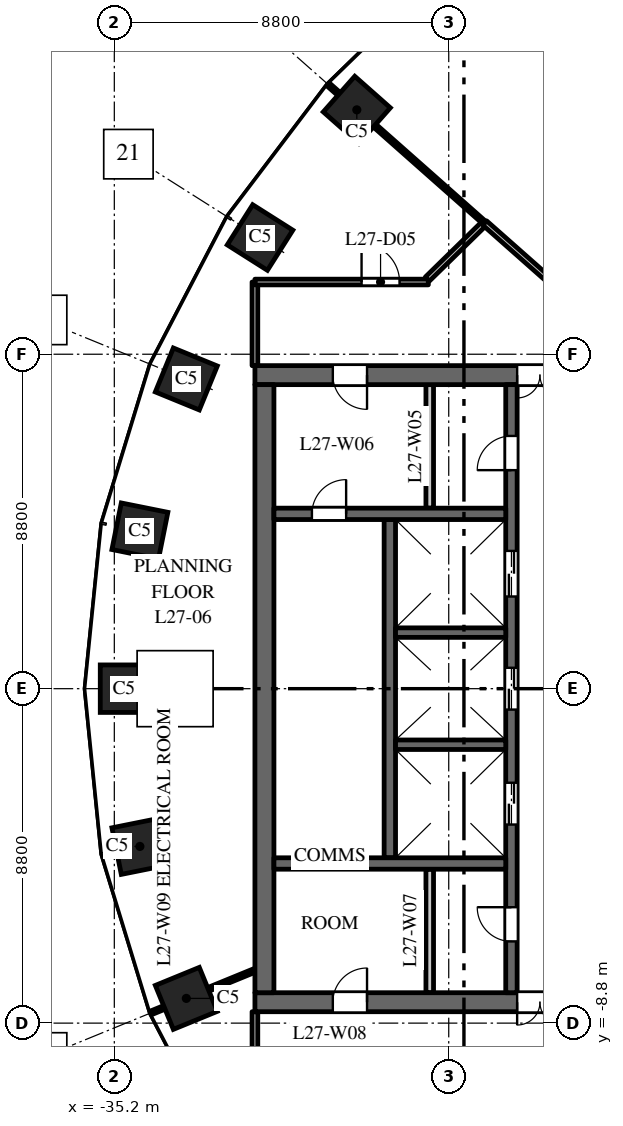
"""IFC4 building model, lengths in metres.
Left out: names, types, materials, properties, quantities, classifications, styles, units other than length and angle.
Written with IfcOpenShell. Run it as: python <this file> out.ifc"""

import sys

from ifc_helpers import new_model, si_unit, direction, frame, frame_2d, origin, origin_2d, place, context, subcontext, project, spatial, rectangle, extrude, element, fill, save


model = new_model("IFC4")
c1 = context("Model", 3, precision=1e-05, world=origin(), true_north=direction((0.0, 1.0)))
c2 = subcontext(c1, "Body", "Model", "MODEL_VIEW")
j1 = project(units=[si_unit("LENGTHUNIT", "METRE"), si_unit("PLANEANGLEUNIT", "RADIAN")], contexts=[c1])
p1 = place(None, origin())
s1 = spatial("IfcSite", under=j1, at=p1, CompositionType="ELEMENT")
p2 = place(p1, origin())
s2 = spatial("IfcBuilding", under=s1, at=p2, CompositionType="ELEMENT")
p3 = place(p2, frame((0.0, 0.0, 120.0)))
s3 = spatial("IfcBuildingStorey", under=s2, at=p3, CompositionType="ELEMENT", Elevation=120.0)
for number, where, z_axis, x_axis in (
    (1, (-28.819, 15.23, 0.0), (0.0, 0.0, 1.0), (-0.663, -0.749, 0.0)),
    (2, (-31.365, 11.871, 0.0), (0.0, 0.0, 1.0), (-0.535, -0.845, 0.0)),
    (3, (-33.305, 8.149, 0.0), (0.0, 0.0, 1.0), (-0.379, -0.925, 0.0)),
    (4, (-34.527, 4.151, 0.0), (0.0, 0.0, 1.0), (-0.197, -0.98, 0.0)),
    (5, (-34.945, 0.0, 0.0), (0.0, 0.0, 1.0), (0.0, -1.0, 0.0)),
    (6, (-34.527, -4.151, 0.0), (0.0, 0.0, 1.0), (0.197, -0.98, 0.0)),
    (7, (-33.305, -8.149, 0.0), (0.0, 0.0, 1.0), (0.379, -0.925, 0.0)),
):
    element("IfcColumn", number, at=place(p3, frame(where, z_axis=z_axis, x_axis=x_axis)), inside=s3, PredefinedType="COLUMN", context=c2, shape_type="SweptSolid", body=[
        extrude(rectangle(XDim=1.25, YDim=1.25, at=origin_2d()), origin(), (0.0, 0.0, 1.0), 4.0),
    ])
p4 = place(p3, frame((-16.5, 8.25, 0.0), z_axis=(0.0, 0.0, 1.0), x_axis=(-1.0, 0.0, 0.0)))
e8 = element("IfcWall", 8, at=p4, inside=s3, PredefinedType="SHEAR", context=c2, shape_type="SweptSolid", body=[
    extrude(rectangle(XDim=15.0, YDim=0.5, at=frame_2d((7.5, 0.0))), origin(), (0.0, 0.0, 1.0), 3.7),
])
p5 = place(p4, frame((6.9, 0.0, 0.0)))
e9 = element("IfcOpeningElement", 9, at=p5, cuts=e8, PredefinedType="OPENING", context=c2, shape_type="SweptSolid", body=[
    extrude(rectangle(XDim=1.2, YDim=2.1, at=frame_2d((0.6, 1.05))), frame((0.0, 0.26, 0.0), z_axis=(0.0, -1.0, 0.0), x_axis=(1.0, 0.0, 0.0)), (0.0, 0.0, 1.0), 0.52),
])
p6 = place(p4, frame((12.05, 0.0, 0.0)))
e10 = element("IfcOpeningElement", 10, at=p6, cuts=e8, PredefinedType="OPENING", context=c2, shape_type="SweptSolid", body=[
    extrude(rectangle(XDim=0.9, YDim=2.1, at=frame_2d((0.45, 1.05))), frame((0.0, 0.26, 0.0), z_axis=(0.0, -1.0, 0.0), x_axis=(1.0, 0.0, 0.0)), (0.0, 0.0, 1.0), 0.52),
])
p7 = place(p3, frame((-16.5, -8.25, 0.0), z_axis=(0.0, 0.0, 1.0), x_axis=(-1.0, 0.0, 0.0)))
e11 = element("IfcWall", 11, at=p7, inside=s3, PredefinedType="SHEAR", context=c2, shape_type="SweptSolid", body=[
    extrude(rectangle(XDim=15.0, YDim=0.5, at=frame_2d((7.5, 0.0))), origin(), (0.0, 0.0, 1.0), 3.7),
])
p8 = place(p7, frame((6.9, 0.0, 0.0)))
e12 = element("IfcOpeningElement", 12, at=p8, cuts=e11, PredefinedType="OPENING", context=c2, shape_type="SweptSolid", body=[
    extrude(rectangle(XDim=1.2, YDim=2.1, at=frame_2d((0.6, 1.05))), frame((0.0, 0.26, 0.0), z_axis=(0.0, -1.0, 0.0), x_axis=(1.0, 0.0, 0.0)), (0.0, 0.0, 1.0), 0.52),
])
p9 = place(p7, frame((12.05, 0.0, 0.0)))
e13 = element("IfcOpeningElement", 13, at=p9, cuts=e11, PredefinedType="OPENING", context=c2, shape_type="SweptSolid", body=[
    extrude(rectangle(XDim=0.9, YDim=2.1, at=frame_2d((0.45, 1.05))), frame((0.0, 0.26, 0.0), z_axis=(0.0, -1.0, 0.0), x_axis=(1.0, 0.0, 0.0)), (0.0, 0.0, 1.0), 0.52),
])
p10 = place(p3, frame((-27.95, -4.45, 0.0), z_axis=(0.0, 0.0, 1.0), x_axis=(0.0, 1.0, 0.0)))
e14 = element("IfcWall", 14, at=p10, inside=s3, PredefinedType="SHEAR", context=c2, shape_type="SweptSolid", body=[
    extrude(rectangle(XDim=8.9, YDim=0.3, at=frame_2d((4.45, 0.0))), origin(), (0.0, 0.0, 1.0), 3.7),
])
p11 = place(p3, frame((-24.75, -8.0, 0.0), z_axis=(0.0, 0.0, 1.0), x_axis=(0.0, 1.0, 0.0)))
e15 = element("IfcWall", 15, at=p11, inside=s3, PredefinedType="SHEAR", context=c2, shape_type="SweptSolid", body=[
    extrude(rectangle(XDim=16.0, YDim=0.3, at=frame_2d((8.0, 0.0))), origin(), (0.0, 0.0, 1.0), 3.7),
])
p12 = place(p11, frame((4.425, 0.0, 0.0)))
e16 = element("IfcOpeningElement", 16, at=p12, cuts=e15, PredefinedType="OPENING", context=c2, shape_type="SweptSolid", body=[
    extrude(rectangle(XDim=1.1, YDim=2.1, at=frame_2d((0.55, 1.05))), frame((0.0, 0.16, 0.0), z_axis=(0.0, -1.0, 0.0), x_axis=(1.0, 0.0, 0.0)), (0.0, 0.0, 1.0), 0.32),
])
p13 = place(p11, frame((7.45, 0.0, 0.0)))
e17 = element("IfcOpeningElement", 17, at=p13, cuts=e15, PredefinedType="OPENING", context=c2, shape_type="SweptSolid", body=[
    extrude(rectangle(XDim=1.1, YDim=2.1, at=frame_2d((0.55, 1.05))), frame((0.0, 0.16, 0.0), z_axis=(0.0, -1.0, 0.0), x_axis=(1.0, 0.0, 0.0)), (0.0, 0.0, 1.0), 0.32),
])
p14 = place(p11, frame((10.425, 0.0, 0.0)))
e18 = element("IfcOpeningElement", 18, at=p14, cuts=e15, PredefinedType="OPENING", context=c2, shape_type="SweptSolid", body=[
    extrude(rectangle(XDim=1.2, YDim=2.1, at=frame_2d((0.6, 1.05))), frame((0.0, 0.16, 0.0), z_axis=(0.0, -1.0, 0.0), x_axis=(1.0, 0.0, 0.0)), (0.0, 0.0, 1.0), 0.32),
])
p15 = place(p11, frame((13.75, 0.0, 0.0)))
e19 = element("IfcOpeningElement", 19, at=p15, cuts=e15, PredefinedType="OPENING", context=c2, shape_type="SweptSolid", body=[
    extrude(rectangle(XDim=0.9, YDim=2.1, at=frame_2d((0.45, 1.05))), frame((0.0, 0.16, 0.0), z_axis=(0.0, -1.0, 0.0), x_axis=(1.0, 0.0, 0.0)), (0.0, 0.0, 1.0), 0.32),
])
p16 = place(p11, frame((1.35, 0.0, 0.0)))
e20 = element("IfcOpeningElement", 20, at=p16, cuts=e15, PredefinedType="OPENING", context=c2, shape_type="SweptSolid", body=[
    extrude(rectangle(XDim=0.9, YDim=2.1, at=frame_2d((0.45, 1.05))), frame((0.0, 0.16, 0.0), z_axis=(0.0, -1.0, 0.0), x_axis=(1.0, 0.0, 0.0)), (0.0, 0.0, 1.0), 0.32),
])
p17 = place(p3, frame((-31.25, -8.0, 0.0), z_axis=(0.0, 0.0, 1.0), x_axis=(0.0, 1.0, 0.0)))
e21 = element("IfcWall", 21, at=p17, inside=s3, PredefinedType="SHEAR", context=c2, shape_type="SweptSolid", body=[
    extrude(rectangle(XDim=16.0, YDim=0.5, at=frame_2d((8.0, 0.0))), origin(), (0.0, 0.0, 1.0), 3.7),
])
p18 = place(p3, frame((-24.9, 4.6, 0.0), z_axis=(0.0, 0.0, 1.0), x_axis=(-1.0, 0.0, 0.0)))
e22 = element("IfcWall", 22, at=p18, inside=s3, PredefinedType="SHEAR", context=c2, shape_type="SweptSolid", body=[
    extrude(rectangle(XDim=6.1, YDim=0.3, at=frame_2d((3.05, 0.0))), origin(), (0.0, 0.0, 1.0), 3.7),
])
p19 = place(p18, frame((4.2, 0.0, 0.0)))
e23 = element("IfcOpeningElement", 23, at=p19, cuts=e22, PredefinedType="OPENING", context=c2, shape_type="SweptSolid", body=[
    extrude(rectangle(XDim=0.9, YDim=2.1, at=frame_2d((0.45, 1.05))), frame((0.0, 0.16, 0.0), z_axis=(0.0, -1.0, 0.0), x_axis=(1.0, 0.0, 0.0)), (0.0, 0.0, 1.0), 0.32),
])
for number, where, z_axis, x_axis in (
    (24, (-26.9, 4.75, 0.0), (0.0, 0.0, 1.0), (0.0, 1.0, 0.0)),
    (25, (-26.9, -8.0, 0.0), (0.0, 0.0, 1.0), (0.0, 1.0, 0.0)),
):
    element("IfcWall", number, at=place(p3, frame(where, z_axis=z_axis, x_axis=x_axis)), inside=s3, PredefinedType="PARTITIONING", context=c2, shape_type="SweptSolid", body=[
        extrude(rectangle(XDim=3.25, YDim=0.2, at=frame_2d((1.625, 0.0))), origin(), (0.0, 0.0, 1.0), 3.7),
    ])
p20 = place(p3, frame((-24.9, -4.6, 0.0), z_axis=(0.0, 0.0, 1.0), x_axis=(-1.0, 0.0, 0.0)))
e26 = element("IfcWall", 26, at=p20, inside=s3, PredefinedType="SHEAR", context=c2, shape_type="SweptSolid", body=[
    extrude(rectangle(XDim=6.1, YDim=0.3, at=frame_2d((3.05, 0.0))), origin(), (0.0, 0.0, 1.0), 3.7),
])
for number, where, z_axis, x_axis in (
    (27, (-24.9, -1.475, 0.0), (0.0, 0.0, 1.0), (-1.0, 0.0, 0.0)),
    (28, (-24.9, 1.475, 0.0), (0.0, 0.0, 1.0), (-1.0, 0.0, 0.0)),
):
    element("IfcWall", number, at=place(p3, frame(where, z_axis=z_axis, x_axis=x_axis)), inside=s3, PredefinedType="SHEAR", context=c2, shape_type="SweptSolid", body=[
        extrude(rectangle(XDim=2.9, YDim=0.25, at=frame_2d((1.45, 0.0))), origin(), (0.0, 0.0, 1.0), 3.7),
    ])
p21 = place(p3, frame((-34.234, -8.53, 0.0), z_axis=(0.0, 0.0, 1.0), x_axis=(0.925344112436, 0.379128307542, 0.0)))
e29 = element("IfcWall", 29, at=p21, inside=s3, PredefinedType="PARTITIONING", context=c2, shape_type="SweptSolid", body=[
    extrude(rectangle(XDim=2.954, YDim=0.1, at=frame_2d((1.477, 0.0))), origin(), (0.0, 0.0, 1.0), 2.9),
])
for number, where, z_axis, x_axis in (
    (30, (-31.5, -10.7, 0.0), (0.0, 0.0, 1.0), (0.0, 1.0, 0.0)),
    (31, (-31.5, 8.5, 0.0), (0.0, 0.0, 1.0), (0.0, 1.0, 0.0)),
):
    element("IfcWall", number, at=place(p3, frame(where, z_axis=z_axis, x_axis=x_axis)), inside=s3, PredefinedType="PARTITIONING", context=c2, shape_type="SweptSolid", body=[
        extrude(rectangle(XDim=2.2, YDim=0.15, at=frame_2d((1.1, 0.0))), origin(), (0.0, 0.0, 1.0), 3.7),
    ])
p22 = place(p3, frame((-31.5, 10.7, 0.0), z_axis=(0.0, 0.0, 1.0), x_axis=(1.0, 0.0, 0.0)))
e32 = element("IfcWall", 32, at=p22, inside=s3, PredefinedType="PARTITIONING", context=c2, shape_type="SweptSolid", body=[
    extrude(rectangle(XDim=4.563, YDim=0.15, at=frame_2d((2.281, 0.0))), origin(), (0.0, 0.0, 1.0), 3.1),
])
p23 = place(p22, frame((2.806, 0.0, 0.0)))
e33 = element("IfcOpeningElement", 33, at=p23, cuts=e32, PredefinedType="OPENING", context=c2, shape_type="SweptSolid", body=[
    extrude(rectangle(XDim=1.0, YDim=2.1, at=frame_2d((0.5, 1.05))), frame((0.0, 0.085, 0.0), z_axis=(0.0, -1.0, 0.0), x_axis=(1.0, 0.0, 0.0)), (0.0, 0.0, 1.0), 0.17),
])
p24 = place(p3, frame((-29.569, 15.895, 0.0), z_axis=(0.0, 0.0, 1.0), x_axis=(0.74891259533, -0.662668789484, 0.0)))
e34 = element("IfcWall", 34, at=p24, inside=s3, PredefinedType="PARTITIONING", context=c2, shape_type="SweptSolid", body=[
    extrude(rectangle(XDim=5.495, YDim=0.1, at=frame_2d((2.747, 0.0))), origin(), (0.0, 0.0, 1.0), 2.9),
])
p25 = place(p3, frame((-26.964, 10.777, 0.0), z_axis=(0.0, 0.0, 1.0), x_axis=(0.714923203438, 0.699202984251, 0.0)))
e35 = element("IfcWall", 35, at=p25, inside=s3, PredefinedType="PARTITIONING", context=c2, shape_type="SweptSolid", body=[
    extrude(rectangle(XDim=2.112, YDim=0.15, at=frame_2d((1.056, 0.0))), origin(), (0.0, 0.0, 1.0), 3.7),
])
p26 = place(p3, frame((-25.454, 12.254, 0.0), z_axis=(0.0, 0.0, 1.0), x_axis=(0.74918446265, -0.662361412617, 0.0)))
e36 = element("IfcWall", 36, at=p26, inside=s3, PredefinedType="PARTITIONING", context=c2, shape_type="SweptSolid", body=[
    extrude(rectangle(XDim=2.455, YDim=0.15, at=frame_2d((1.228, 0.0))), origin(), (0.0, 0.0, 1.0), 3.7),
])
p27 = place(p12, origin())
e37 = element("IfcDoor", 37, at=p27, inside=s3, OperationType="DOUBLE_DOOR_SLIDING", PredefinedType="DOOR", context=c2, shape_type="SweptSolid", body=[
    extrude(rectangle(XDim=1.1, YDim=2.1, at=frame_2d((0.55, 1.05))), frame((0.0, 0.025, 0.0), z_axis=(0.0, -1.0, 0.0), x_axis=(1.0, 0.0, 0.0)), (0.0, 0.0, 1.0), 0.05),
])
fill(e16, e37)
p28 = place(p13, origin())
e38 = element("IfcDoor", 38, at=p28, inside=s3, OperationType="DOUBLE_DOOR_SLIDING", PredefinedType="DOOR", context=c2, shape_type="SweptSolid", body=[
    extrude(rectangle(XDim=1.1, YDim=2.1, at=frame_2d((0.55, 1.05))), frame((0.0, 0.025, 0.0), z_axis=(0.0, -1.0, 0.0), x_axis=(1.0, 0.0, 0.0)), (0.0, 0.0, 1.0), 0.05),
])
fill(e17, e38)
p29 = place(p14, origin())
e39 = element("IfcDoor", 39, at=p29, inside=s3, OperationType="DOUBLE_DOOR_SLIDING", PredefinedType="DOOR", context=c2, shape_type="SweptSolid", body=[
    extrude(rectangle(XDim=1.2, YDim=2.1, at=frame_2d((0.6, 1.05))), frame((0.0, 0.025, 0.0), z_axis=(0.0, -1.0, 0.0), x_axis=(1.0, 0.0, 0.0)), (0.0, 0.0, 1.0), 0.05),
])
fill(e18, e39)
p30 = place(p5, origin())
e40 = element("IfcDoor", 40, at=p30, inside=s3, OperationType="DOUBLE_DOOR_DOUBLE_SWING", PredefinedType="DOOR", context=c2, shape_type="SweptSolid", body=[
    extrude(rectangle(XDim=1.2, YDim=2.1, at=frame_2d((0.6, 1.05))), frame((0.0, 0.025, 0.0), z_axis=(0.0, -1.0, 0.0), x_axis=(1.0, 0.0, 0.0)), (0.0, 0.0, 1.0), 0.05),
])
fill(e9, e40)
p31 = place(p8, origin())
e41 = element("IfcDoor", 41, at=p31, inside=s3, OperationType="DOUBLE_DOOR_DOUBLE_SWING", PredefinedType="DOOR", context=c2, shape_type="SweptSolid", body=[
    extrude(rectangle(XDim=1.2, YDim=2.1, at=frame_2d((0.6, 1.05))), frame((0.0, 0.025, 0.0), z_axis=(0.0, -1.0, 0.0), x_axis=(1.0, 0.0, 0.0)), (0.0, 0.0, 1.0), 0.05),
])
fill(e12, e41)
p32 = place(p15, origin())
e42 = element("IfcDoor", 42, at=p32, inside=s3, OperationType="SINGLE_SWING_RIGHT", PredefinedType="DOOR", context=c2, shape_type="SweptSolid", body=[
    extrude(rectangle(XDim=0.9, YDim=2.1, at=frame_2d((0.45, 1.05))), frame((0.0, 0.025, 0.0), z_axis=(0.0, -1.0, 0.0), x_axis=(1.0, 0.0, 0.0)), (0.0, 0.0, 1.0), 0.05),
])
fill(e19, e42)
p33 = place(p6, origin())
e43 = element("IfcDoor", 43, at=p33, inside=s3, OperationType="SINGLE_SWING_RIGHT", PredefinedType="DOOR", context=c2, shape_type="SweptSolid", body=[
    extrude(rectangle(XDim=0.9, YDim=2.1, at=frame_2d((0.45, 1.05))), frame((0.0, 0.025, 0.0), z_axis=(0.0, -1.0, 0.0), x_axis=(1.0, 0.0, 0.0)), (0.0, 0.0, 1.0), 0.05),
])
fill(e10, e43)
p34 = place(p16, origin())
e44 = element("IfcDoor", 44, at=p34, inside=s3, OperationType="SINGLE_SWING_LEFT", PredefinedType="DOOR", context=c2, shape_type="SweptSolid", body=[
    extrude(rectangle(XDim=0.9, YDim=2.1, at=frame_2d((0.45, 1.05))), frame((0.0, 0.025, 0.0), z_axis=(0.0, -1.0, 0.0), x_axis=(1.0, 0.0, 0.0)), (0.0, 0.0, 1.0), 0.05),
])
fill(e20, e44)
p35 = place(p9, origin())
e45 = element("IfcDoor", 45, at=p35, inside=s3, OperationType="SINGLE_SWING_LEFT", PredefinedType="DOOR", context=c2, shape_type="SweptSolid", body=[
    extrude(rectangle(XDim=0.9, YDim=2.1, at=frame_2d((0.45, 1.05))), frame((0.0, 0.025, 0.0), z_axis=(0.0, -1.0, 0.0), x_axis=(1.0, 0.0, 0.0)), (0.0, 0.0, 1.0), 0.05),
])
fill(e13, e45)
p36 = place(p19, origin())
e46 = element("IfcDoor", 46, at=p36, inside=s3, OperationType="SINGLE_SWING_LEFT", PredefinedType="DOOR", context=c2, shape_type="SweptSolid", body=[
    extrude(rectangle(XDim=0.9, YDim=2.1, at=frame_2d((0.45, 1.05))), frame((0.0, 0.025, 0.0), z_axis=(0.0, -1.0, 0.0), x_axis=(1.0, 0.0, 0.0)), (0.0, 0.0, 1.0), 0.05),
])
fill(e23, e46)
p37 = place(p23, origin())
e47 = element("IfcDoor", 47, at=p37, inside=s3, OperationType="SINGLE_SWING_LEFT", PredefinedType="DOOR", context=c2, shape_type="SweptSolid", body=[
    extrude(rectangle(XDim=1.0, YDim=2.1, at=frame_2d((0.5, 1.05))), frame((0.0, 0.025, 0.0), z_axis=(0.0, -1.0, 0.0), x_axis=(1.0, 0.0, 0.0)), (0.0, 0.0, 1.0), 0.05),
])
fill(e33, e47)
save(model, sys.argv[1])
